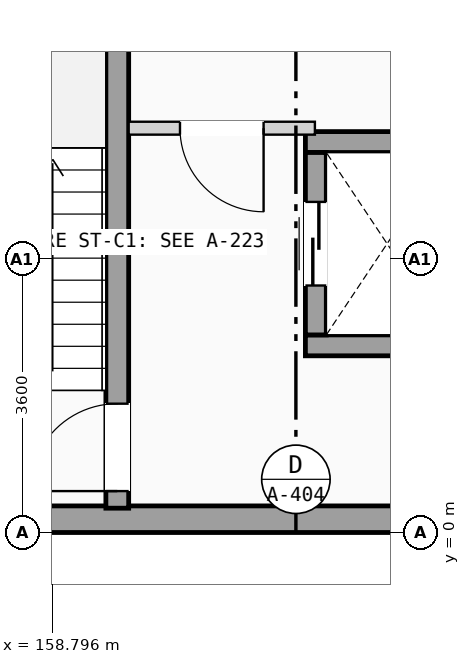
"""IFC4 building model, lengths in metres.
Left out: names, types, materials, properties, quantities, classifications, styles, units other than length and angle.
Written with IfcOpenShell. Run it as: python <this file> out.ifc"""

import sys

from ifc_helpers import new_model, si_unit, direction, frame, frame_2d, origin, place, context, subcontext, project, spatial, rectangle, extrude, element, fill, save


model = new_model("IFC4")
c1 = context("Model", 3, precision=1e-05, world=origin(), true_north=direction((0.0, 1.0)))
c2 = subcontext(c1, "Body", "Model", "MODEL_VIEW")
j1 = project(units=[si_unit("LENGTHUNIT", "METRE"), si_unit("PLANEANGLEUNIT", "RADIAN")], contexts=[c1])
p1 = place(None, origin())
s1 = spatial("IfcSite", under=j1, at=p1, CompositionType="ELEMENT")
p2 = place(p1, origin())
s2 = spatial("IfcBuilding", under=s1, at=p2, CompositionType="ELEMENT")
p3 = place(p2, frame((0.0, 0.0, -4.2)))
s3 = spatial("IfcBuildingStorey", under=s2, at=p3, CompositionType="ELEMENT", Elevation=-4.2)
p4 = place(p3, frame((100.8, 0.175, 0.0), z_axis=(0.0, 0.0, 1.0), x_axis=(1.0, 0.0, 0.0)))
e1 = element("IfcWall", 1, at=p4, inside=s3, PredefinedType="SOLIDWALL", context=c2, shape_type="SweptSolid", body=[
    extrude(rectangle(XDim=72.0, YDim=0.35, at=frame_2d((36.0, 0.0))), origin(), (0.0, 0.0, 1.0), 3.92),
])
p5 = place(p3, frame((159.65, 0.32, 0.0), z_axis=(0.0, 0.0, 1.0), x_axis=(0.0, 1.0, 0.0)))
e2 = element("IfcWall", 2, at=p5, inside=s3, PredefinedType="SHEAR", context=c2, shape_type="SweptSolid", body=[
    extrude(rectangle(XDim=7.0, YDim=0.3, at=frame_2d((3.5, 0.0))), origin(), (0.0, 0.0, 1.0), 3.92),
])
p6 = place(p5, frame((0.225, 0.0, 0.0)))
e3 = element("IfcOpeningElement", 3, at=p6, cuts=e2, PredefinedType="OPENING", context=c2, shape_type="SweptSolid", body=[
    extrude(rectangle(XDim=1.15, YDim=2.12, at=frame_2d((0.575, 1.06))), frame((0.0, 0.16, 0.0), z_axis=(0.0, -1.0, 0.0), x_axis=(1.0, 0.0, 0.0)), (0.0, 0.0, 1.0), 0.32),
])
for number, where, z_axis, x_axis in (
    (4, (162.125, 2.462, 0.0), (0.0, 0.0, 1.0), (1.0, 0.0, 0.0)),
    (5, (162.125, 5.137, 0.0), (0.0, 0.0, 1.0), (1.0, 0.0, 0.0)),
):
    element("IfcWall", number, at=place(p3, frame(where, z_axis=z_axis, x_axis=x_axis)), inside=s3, PredefinedType="SHEAR", context=c2, shape_type="SweptSolid", body=[
        extrude(rectangle(XDim=2.15, YDim=0.275, at=frame_2d((1.075, 0.0))), origin(), (0.0, 0.0, 1.0), 3.92),
    ])
p7 = place(p3, frame((162.262, 2.6, 0.0), z_axis=(0.0, 0.0, 1.0), x_axis=(0.0, 1.0, 0.0)))
e6 = element("IfcWall", 6, at=p7, inside=s3, PredefinedType="SHEAR", context=c2, shape_type="SweptSolid", body=[
    extrude(rectangle(XDim=2.4, YDim=0.275, at=frame_2d((1.2, 0.0))), origin(), (0.0, 0.0, 1.0), 3.92),
])
p8 = place(p7, frame((0.65, 0.0, 0.0)))
e7 = element("IfcOpeningElement", 7, at=p8, cuts=e6, PredefinedType="OPENING", context=c2, shape_type="SweptSolid", body=[
    extrude(rectangle(XDim=1.1, YDim=2.15, at=frame_2d((0.55, 1.075))), frame((0.0, 0.147, 0.0), z_axis=(0.0, -1.0, 0.0), x_axis=(1.0, 0.0, 0.0)), (0.0, 0.0, 1.0), 0.295),
])
p9 = place(p3, frame((159.8, 5.32, 0.0), z_axis=(0.0, 0.0, 1.0), x_axis=(1.0, 0.0, 0.0)))
e8 = element("IfcWall", 8, at=p9, inside=s3, PredefinedType="PARTITIONING", context=c2, shape_type="SweptSolid", body=[
    extrude(rectangle(XDim=2.45, YDim=0.17, at=frame_2d((1.225, 0.0))), origin(), (0.0, 0.0, 1.0), 3.84),
])
p10 = place(p9, frame((0.675, 0.0, 0.0)))
e9 = element("IfcOpeningElement", 9, at=p10, cuts=e8, PredefinedType="OPENING", context=c2, shape_type="SweptSolid", body=[
    extrude(rectangle(XDim=1.1, YDim=2.12, at=frame_2d((0.55, 1.06))), frame((0.0, 0.095, 0.0), z_axis=(0.0, -1.0, 0.0), x_axis=(1.0, 0.0, 0.0)), (0.0, 0.0, 1.0), 0.19),
])
p11 = place(p6, origin())
e10 = element("IfcDoor", 10, at=p11, inside=s3, OperationType="SINGLE_SWING_LEFT", PredefinedType="DOOR", context=c2, shape_type="SweptSolid", body=[
    extrude(rectangle(XDim=1.15, YDim=2.12, at=frame_2d((0.575, 1.06))), frame((0.0, 0.025, 0.0), z_axis=(0.0, -1.0, 0.0), x_axis=(1.0, 0.0, 0.0)), (0.0, 0.0, 1.0), 0.05),
])
fill(e3, e10)
p12 = place(p8, origin())
e11 = element("IfcDoor", 11, at=p12, inside=s3, OperationType="SLIDING_TO_LEFT", PredefinedType="DOOR", context=c2, shape_type="SweptSolid", body=[
    extrude(rectangle(XDim=1.1, YDim=2.15, at=frame_2d((0.55, 1.075))), frame((0.0, 0.025, 0.0), z_axis=(0.0, -1.0, 0.0), x_axis=(1.0, 0.0, 0.0)), (0.0, 0.0, 1.0), 0.05),
])
fill(e7, e11)
p13 = place(p10, frame((1.1, 0.0, 0.0), z_axis=(0.0, 0.0, 1.0), x_axis=(-1.0, 0.0, 0.0)))
e12 = element("IfcDoor", 12, at=p13, inside=s3, OperationType="SINGLE_SWING_RIGHT", PredefinedType="DOOR", context=c2, shape_type="SweptSolid", body=[
    extrude(rectangle(XDim=1.1, YDim=2.12, at=frame_2d((0.55, 1.06))), frame((0.0, 0.025, 0.0), z_axis=(0.0, -1.0, 0.0), x_axis=(1.0, 0.0, 0.0)), (0.0, 0.0, 1.0), 0.05),
])
fill(e9, e12)
save(model, sys.argv[1])
